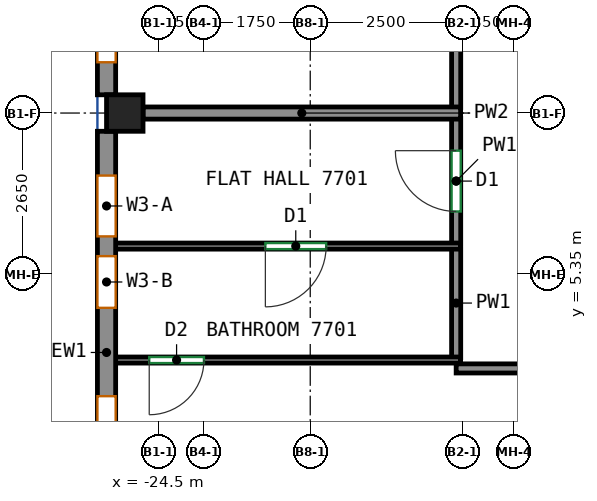
"""IFC4 building model, lengths in metres.
Left out: names, types, materials, properties, quantities, classifications, styles, units other than length and angle.
Written with IfcOpenShell. Run it as: python <this file> out.ifc"""

import sys

from ifc_helpers import new_model, si_unit, direction, frame, frame_2d, origin, origin_2d, place, context, subcontext, project, spatial, rectangle, extrude, source, transform, mapped, element, fill, save


model = new_model("IFC4")
c1 = context("Model", 3, precision=1e-05, world=origin(), true_north=direction((0.0, 1.0)))
c2 = subcontext(c1, "Body", "Model", "MODEL_VIEW")
j1 = project(units=[si_unit("LENGTHUNIT", "METRE"), si_unit("PLANEANGLEUNIT", "RADIAN")], contexts=[c1])
p1 = place(None, origin())
s1 = spatial("IfcSite", under=j1, at=p1, CompositionType="ELEMENT")
p2 = place(p1, origin())
s2 = spatial("IfcBuilding", under=s1, at=p2, CompositionType="ELEMENT")
p3 = place(p2, frame((0.0, 0.0, 308.6)))
s3 = spatial("IfcBuildingStorey", under=s2, at=p3, CompositionType="ELEMENT", Elevation=308.6)
m1 = source(origin(), c2, "Body", "SweptSolid", [
    extrude(rectangle(XDim=0.6, YDim=0.6, at=origin_2d()), origin(), (0.0, 0.0, 1.0), 3.12),
])
p4 = place(p3, frame((-25.05, 8.0, 0.0), z_axis=(0.0, 0.0, 1.0), x_axis=(1.0, 0.0, 0.0)))
e1 = element("IfcColumn", 1, at=p4, inside=s3, PredefinedType="COLUMN", context=c2, shape_type="MappedRepresentation", body=[
    mapped(m1, transform((0.0, 0.0, 0.0))),
])
m2 = source(origin(), c2, "Body", "SweptSolid", [
    extrude(rectangle(XDim=13.082, YDim=0.3, at=frame_2d((6.541, 0.0))), origin(), (0.0, 0.0, 1.0), 3.12),
])
p5 = place(p3, frame((-25.35, 21.382, 0.0), z_axis=(0.0, 0.0, 1.0), x_axis=(0.0, -1.0, 0.0)))
e2 = element("IfcWall", 2, at=p5, inside=s3, PredefinedType="SOLIDWALL", context=c2, shape_type="MappedRepresentation", body=[
    mapped(m2, transform((0.0, 0.0, 0.0))),
])
p6 = place(p5, frame((0.535, 0.0, 0.8)))
e3 = element("IfcOpeningElement", 3, at=p6, cuts=e2, PredefinedType="OPENING", context=c2, shape_type="SweptSolid", body=[
    extrude(rectangle(XDim=2.2, YDim=2.05, at=frame_2d((1.1, 1.025))), frame((0.0, 0.16, 0.0), z_axis=(0.0, -1.0, 0.0), x_axis=(1.0, 0.0, 0.0)), (0.0, 0.0, 1.0), 0.32),
])
p7 = place(p5, frame((3.806, 0.0, 0.8)))
e4 = element("IfcOpeningElement", 4, at=p7, cuts=e2, PredefinedType="OPENING", context=c2, shape_type="SweptSolid", body=[
    extrude(rectangle(XDim=2.2, YDim=2.05, at=frame_2d((1.1, 1.025))), frame((0.0, 0.16, 0.0), z_axis=(0.0, -1.0, 0.0), x_axis=(1.0, 0.0, 0.0)), (0.0, 0.0, 1.0), 0.32),
])
p8 = place(p5, frame((7.076, 0.0, 0.8)))
e5 = element("IfcOpeningElement", 5, at=p8, cuts=e2, PredefinedType="OPENING", context=c2, shape_type="SweptSolid", body=[
    extrude(rectangle(XDim=2.2, YDim=2.05, at=frame_2d((1.1, 1.025))), frame((0.0, 0.16, 0.0), z_axis=(0.0, -1.0, 0.0), x_axis=(1.0, 0.0, 0.0)), (0.0, 0.0, 1.0), 0.32),
])
p9 = place(p5, frame((10.347, 0.0, 0.8)))
e6 = element("IfcOpeningElement", 6, at=p9, cuts=e2, PredefinedType="OPENING", context=c2, shape_type="SweptSolid", body=[
    extrude(rectangle(XDim=2.2, YDim=2.05, at=frame_2d((1.1, 1.025))), frame((0.0, 0.16, 0.0), z_axis=(0.0, -1.0, 0.0), x_axis=(1.0, 0.0, 0.0)), (0.0, 0.0, 1.0), 0.32),
])
m3 = source(origin(), c2, "Body", "SweptSolid", [
    extrude(rectangle(XDim=7.275, YDim=0.3, at=frame_2d((3.637, 0.0))), origin(), (0.0, 0.0, 1.0), 3.12),
])
p10 = place(p3, frame((-25.35, 7.7, 0.0), z_axis=(0.0, 0.0, 1.0), x_axis=(0.0, -1.0, 0.0)))
e7 = element("IfcWall", 7, at=p10, inside=s3, PredefinedType="SOLIDWALL", context=c2, shape_type="MappedRepresentation", body=[
    mapped(m3, transform((0.0, 0.0, 0.0))),
])
p11 = place(p10, frame((0.728, 0.0, 0.8)))
e8 = element("IfcOpeningElement", 8, at=p11, cuts=e7, PredefinedType="OPENING", context=c2, shape_type="SweptSolid", body=[
    extrude(rectangle(XDim=1.0, YDim=2.05, at=frame_2d((0.5, 1.025))), frame((0.0, 0.16, 0.0), z_axis=(0.0, -1.0, 0.0), x_axis=(1.0, 0.0, 0.0)), (0.0, 0.0, 1.0), 0.32),
])
p12 = place(p10, frame((4.356, 0.0, 0.8)))
e9 = element("IfcOpeningElement", 9, at=p12, cuts=e7, PredefinedType="OPENING", context=c2, shape_type="SweptSolid", body=[
    extrude(rectangle(XDim=2.2, YDim=2.05, at=frame_2d((1.1, 1.025))), frame((0.0, 0.16, 0.0), z_axis=(0.0, -1.0, 0.0), x_axis=(1.0, 0.0, 0.0)), (0.0, 0.0, 1.0), 0.32),
])
p13 = place(p10, frame((2.053, 0.0, 0.8)))
e10 = element("IfcOpeningElement", 10, at=p13, cuts=e7, PredefinedType="OPENING", context=c2, shape_type="SweptSolid", body=[
    extrude(rectangle(XDim=0.85, YDim=2.05, at=frame_2d((0.425, 1.025))), frame((0.0, 0.16, 0.0), z_axis=(0.0, -1.0, 0.0), x_axis=(1.0, 0.0, 0.0)), (0.0, 0.0, 1.0), 0.32),
])
p14 = place(p3, frame((-19.6, 3.8, 0.0), z_axis=(0.0, 0.0, 1.0), x_axis=(1.0, 0.0, 0.0)))
e11 = element("IfcWall", 11, at=p14, inside=s3, PredefinedType="PARTITIONING", context=c2, shape_type="SweptSolid", body=[
    extrude(rectangle(XDim=4.815, YDim=0.15, at=frame_2d((2.408, 0.0))), origin(), (0.0, 0.0, 1.0), 3.12),
])
p15 = place(p3, frame((-19.6, 3.978, 0.0), z_axis=(0.0, 0.0, 1.0), x_axis=(0.0, 1.0, 0.0)))
e12 = element("IfcWall", 12, at=p15, inside=s3, PredefinedType="PARTITIONING", context=c2, shape_type="SweptSolid", body=[
    extrude(rectangle(XDim=1.794, YDim=0.15, at=frame_2d((0.897, 0.0))), origin(), (0.0, 0.0, 1.0), 3.12),
])
p16 = place(p3, frame((-19.6, 5.852, 0.0), z_axis=(0.0, 0.0, 1.0), x_axis=(0.0, 1.0, 0.0)))
e13 = element("IfcWall", 13, at=p16, inside=s3, PredefinedType="PARTITIONING", context=c2, shape_type="SweptSolid", body=[
    extrude(rectangle(XDim=2.058, YDim=0.15, at=frame_2d((1.029, 0.0))), origin(), (0.0, 0.0, 1.0), 3.12),
])
p17 = place(p16, frame((0.529, 0.0, 0.0)))
e14 = element("IfcOpeningElement", 14, at=p17, cuts=e13, PredefinedType="OPENING", context=c2, shape_type="SweptSolid", body=[
    extrude(rectangle(XDim=1.0, YDim=2.1, at=frame_2d((0.5, 1.05))), frame((0.0, 0.085, 0.0), z_axis=(0.0, -1.0, 0.0), x_axis=(1.0, 0.0, 0.0)), (0.0, 0.0, 1.0), 0.17),
])
p18 = place(p3, frame((-19.6, 8.09, 0.0), z_axis=(0.0, 0.0, 1.0), x_axis=(0.0, 1.0, 0.0)))
e15 = element("IfcWall", 15, at=p18, inside=s3, PredefinedType="PARTITIONING", context=c2, shape_type="SweptSolid", body=[
    extrude(rectangle(XDim=15.635, YDim=0.15, at=frame_2d((7.817, 0.0))), origin(), (0.0, 0.0, 1.0), 3.12),
])
p19 = place(p3, frame((-19.527, 3.938, 0.0), z_axis=(0.0, 0.0, 1.0), x_axis=(-1.0, 0.0, 0.0)))
e16 = element("IfcWall", 16, at=p19, inside=s3, PredefinedType="PARTITIONING", context=c2, shape_type="SweptSolid", body=[
    extrude(rectangle(XDim=5.723, YDim=0.1, at=frame_2d((2.861, 0.0))), origin(), (0.0, 0.0, 1.0), 3.12),
])
p20 = place(p19, frame((4.221, 0.0, 0.0)))
e17 = element("IfcOpeningElement", 17, at=p20, cuts=e16, PredefinedType="OPENING", context=c2, shape_type="SweptSolid", body=[
    extrude(rectangle(XDim=0.9, YDim=2.1, at=frame_2d((0.45, 1.05))), frame((0.0, 0.06, 0.0), z_axis=(0.0, -1.0, 0.0), x_axis=(1.0, 0.0, 0.0)), (0.0, 0.0, 1.0), 0.12),
])
p21 = place(p3, frame((-19.527, 5.812, 0.0), z_axis=(0.0, 0.0, 1.0), x_axis=(-1.0, 0.0, 0.0)))
e18 = element("IfcWall", 18, at=p21, inside=s3, PredefinedType="PARTITIONING", context=c2, shape_type="SweptSolid", body=[
    extrude(rectangle(XDim=5.723, YDim=0.1, at=frame_2d((2.861, 0.0))), origin(), (0.0, 0.0, 1.0), 3.12),
])
p22 = place(p21, frame((2.211, 0.0, 0.0)))
e19 = element("IfcOpeningElement", 19, at=p22, cuts=e18, PredefinedType="OPENING", context=c2, shape_type="SweptSolid", body=[
    extrude(rectangle(XDim=1.0, YDim=2.1, at=frame_2d((0.5, 1.05))), frame((0.0, 0.06, 0.0), z_axis=(0.0, -1.0, 0.0), x_axis=(1.0, 0.0, 0.0)), (0.0, 0.0, 1.0), 0.12),
])
p23 = place(p3, frame((-19.527, 8.0, 0.0), z_axis=(0.0, 0.0, 1.0), x_axis=(-1.0, 0.0, 0.0)))
e20 = element("IfcWall", 20, at=p23, inside=s3, PredefinedType="PARTITIONING", context=c2, shape_type="SweptSolid", body=[
    extrude(rectangle(XDim=5.223, YDim=0.2, at=frame_2d((2.611, 0.0))), origin(), (0.0, 0.0, 1.0), 2.57),
])
p24 = place(p9, origin())
e21 = element("IfcWindow", 21, at=p24, inside=s3, PartitioningType="SINGLE_PANEL", PredefinedType="WINDOW", context=c2, shape_type="SweptSolid", body=[
    extrude(rectangle(XDim=2.2, YDim=2.05, at=frame_2d((1.1, 1.025))), frame((0.0, 0.03, 0.0), z_axis=(0.0, -1.0, 0.0), x_axis=(1.0, 0.0, 0.0)), (0.0, 0.0, 1.0), 0.06),
])
fill(e6, e21)
p25 = place(p11, origin())
e22 = element("IfcWindow", 22, at=p25, inside=s3, PartitioningType="SINGLE_PANEL", PredefinedType="WINDOW", context=c2, shape_type="SweptSolid", body=[
    extrude(rectangle(XDim=1.0, YDim=2.05, at=frame_2d((0.5, 1.025))), frame((0.0, 0.03, 0.0), z_axis=(0.0, -1.0, 0.0), x_axis=(1.0, 0.0, 0.0)), (0.0, 0.0, 1.0), 0.06),
])
fill(e8, e22)
p26 = place(p12, origin())
e23 = element("IfcWindow", 23, at=p26, inside=s3, PartitioningType="SINGLE_PANEL", PredefinedType="WINDOW", context=c2, shape_type="SweptSolid", body=[
    extrude(rectangle(XDim=2.2, YDim=2.05, at=frame_2d((1.1, 1.025))), frame((0.0, 0.03, 0.0), z_axis=(0.0, -1.0, 0.0), x_axis=(1.0, 0.0, 0.0)), (0.0, 0.0, 1.0), 0.06),
])
fill(e9, e23)
p27 = place(p20, origin())
e24 = element("IfcDoor", 24, at=p27, inside=s3, OperationType="SINGLE_SWING_RIGHT", PredefinedType="DOOR", context=c2, shape_type="SweptSolid", body=[
    extrude(rectangle(XDim=0.9, YDim=2.1, at=frame_2d((0.45, 1.05))), frame((0.0, 0.025, 0.0), z_axis=(0.0, -1.0, 0.0), x_axis=(1.0, 0.0, 0.0)), (0.0, 0.0, 1.0), 0.05),
])
fill(e17, e24)
p28 = place(p22, origin())
e25 = element("IfcDoor", 25, at=p28, inside=s3, OperationType="SINGLE_SWING_RIGHT", PredefinedType="DOOR", context=c2, shape_type="SweptSolid", body=[
    extrude(rectangle(XDim=1.0, YDim=2.1, at=frame_2d((0.5, 1.05))), frame((0.0, 0.025, 0.0), z_axis=(0.0, -1.0, 0.0), x_axis=(1.0, 0.0, 0.0)), (0.0, 0.0, 1.0), 0.05),
])
fill(e19, e25)
p29 = place(p17, origin())
e26 = element("IfcDoor", 26, at=p29, inside=s3, OperationType="SINGLE_SWING_RIGHT", PredefinedType="DOOR", context=c2, shape_type="SweptSolid", body=[
    extrude(rectangle(XDim=1.0, YDim=2.1, at=frame_2d((0.5, 1.05))), frame((0.0, 0.025, 0.0), z_axis=(0.0, -1.0, 0.0), x_axis=(1.0, 0.0, 0.0)), (0.0, 0.0, 1.0), 0.05),
])
fill(e14, e26)
p30 = place(p13, origin())
e27 = element("IfcWindow", 27, at=p30, inside=s3, PartitioningType="SINGLE_PANEL", PredefinedType="WINDOW", context=c2, shape_type="SweptSolid", body=[
    extrude(rectangle(XDim=0.85, YDim=2.05, at=frame_2d((0.425, 1.025))), frame((0.0, 0.03, 0.0), z_axis=(0.0, -1.0, 0.0), x_axis=(1.0, 0.0, 0.0)), (0.0, 0.0, 1.0), 0.06),
])
fill(e10, e27)
save(model, sys.argv[1])
